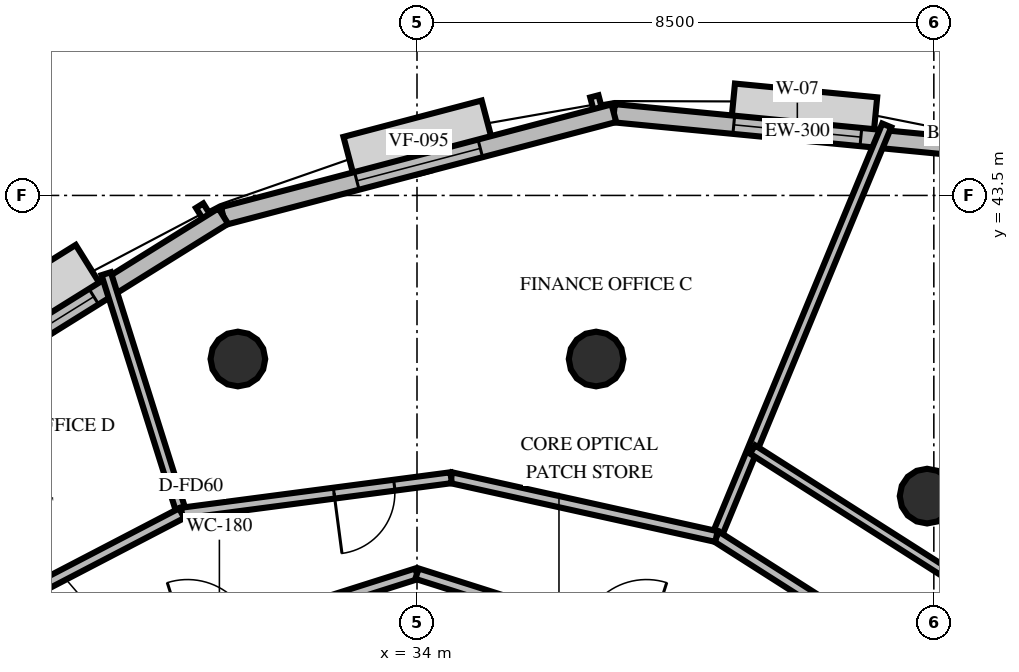
"""IFC4 building model, lengths in metres.
Left out: names, types, materials, properties, quantities, classifications, styles, units other than length and angle.
Written with IfcOpenShell. Run it as: python <this file> out.ifc"""

import sys

from ifc_helpers import new_model, si_unit, direction, frame, frame_2d, origin, origin_2d, place, context, subcontext, project, spatial, rectangle, circle, extrude, element, fill, save


model = new_model("IFC4")
c1 = context("Model", 3, precision=1e-05, world=origin(), true_north=direction((0.0, 1.0)))
c2 = subcontext(c1, "Body", "Model", "MODEL_VIEW")
j1 = project(units=[si_unit("LENGTHUNIT", "METRE"), si_unit("PLANEANGLEUNIT", "RADIAN")], contexts=[c1])
p1 = place(None, origin())
s1 = spatial("IfcSite", under=j1, at=p1, CompositionType="ELEMENT")
p2 = place(p1, origin())
s2 = spatial("IfcBuilding", under=s1, at=p2, CompositionType="ELEMENT")
p3 = place(p2, frame((0.0, 0.0, 230.4)))
s3 = spatial("IfcBuildingStorey", under=s2, at=p3, CompositionType="ELEMENT", Elevation=230.4)
for number, where, z_axis, x_axis in (
    (1, (42.389, 38.555, -0.22), (0.0, 0.0, 1.0), (1.0, 0.0, 0.0)),
    (2, (36.946, 40.81, -0.22), (0.0, 0.0, 1.0), (1.0, 0.0, 0.0)),
    (3, (31.054, 40.81, -0.22), (0.0, 0.0, 1.0), (1.0, 0.0, 0.0)),
):
    element("IfcColumn", number, at=place(p3, frame(where, z_axis=z_axis, x_axis=x_axis)), inside=s3, PredefinedType="COLUMN", context=c2, shape_type="SweptSolid", body=[
        extrude(circle(Radius=0.45, at=origin_2d()), origin(), (0.0, 0.0, 1.0), 3.82),
    ])
p4 = place(p3, frame((43.272, 44.269, 0.0), z_axis=(0.0, 0.0, 1.0), x_axis=(-0.995368057739, 0.096137555791, 0.0)))
e4 = element("IfcWall", 4, at=p4, inside=s3, PredefinedType="SOLIDWALL", context=c2, shape_type="SweptSolid", body=[
    extrude(rectangle(XDim=6.062, YDim=0.3, at=frame_2d((3.031, 0.0))), origin(), (0.0, 0.0, 1.0), 2.76),
])
p5 = place(p4, frame((1.981, 0.0, 0.8)))
e5 = element("IfcOpeningElement", 5, at=p5, cuts=e4, PredefinedType="OPENING", context=c2, shape_type="SweptSolid", body=[
    extrude(rectangle(XDim=2.1, YDim=1.85, at=frame_2d((1.05, 0.925))), frame((0.0, 0.16, 0.0), z_axis=(0.0, -1.0, 0.0), x_axis=(1.0, 0.0, 0.0)), (0.0, 0.0, 1.0), 0.32),
])
p6 = place(p3, frame((37.238, 44.852, 0.0), z_axis=(0.0, 0.0, 1.0), x_axis=(-0.967065492063, -0.254527668555, 0.0)))
e6 = element("IfcWall", 6, at=p6, inside=s3, PredefinedType="SOLIDWALL", context=c2, shape_type="SweptSolid", body=[
    extrude(rectangle(XDim=6.643, YDim=0.3, at=frame_2d((3.322, 0.0))), origin(), (0.0, 0.0, 1.0), 2.76),
])
p7 = place(p6, frame((2.272, 0.0, 0.8)))
e7 = element("IfcOpeningElement", 7, at=p7, cuts=e6, PredefinedType="OPENING", context=c2, shape_type="SweptSolid", body=[
    extrude(rectangle(XDim=2.1, YDim=1.85, at=frame_2d((1.05, 0.925))), frame((0.0, 0.16, 0.0), z_axis=(0.0, -1.0, 0.0), x_axis=(1.0, 0.0, 0.0)), (0.0, 0.0, 1.0), 0.32),
])
p8 = place(p3, frame((30.814, 43.161, 0.0), z_axis=(0.0, 0.0, 1.0), x_axis=(-0.848899232852, -0.528554720406, 0.0)))
e8 = element("IfcWall", 8, at=p8, inside=s3, PredefinedType="SOLIDWALL", context=c2, shape_type="SweptSolid", body=[
    extrude(rectangle(XDim=7.115, YDim=0.3, at=frame_2d((3.558, 0.0))), origin(), (0.0, 0.0, 1.0), 2.76),
])
p9 = place(p8, frame((2.508, 0.0, 0.8)))
e9 = element("IfcOpeningElement", 9, at=p9, cuts=e8, PredefinedType="OPENING", context=c2, shape_type="SweptSolid", body=[
    extrude(rectangle(XDim=2.1, YDim=1.85, at=frame_2d((1.05, 0.925))), frame((0.0, 0.16, 0.0), z_axis=(0.0, -1.0, 0.0), x_axis=(1.0, 0.0, 0.0)), (0.0, 0.0, 1.0), 0.32),
])
p10 = place(p3, frame((27.5, 35.219, 0.0), z_axis=(0.0, 0.0, 1.0), x_axis=(0.953228121756, 0.302251795518, 0.0)))
e10 = element("IfcWall", 10, at=p10, inside=s3, PredefinedType="PARTITIONING", context=c2, shape_type="SweptSolid", body=[
    extrude(rectangle(XDim=6.819, YDim=0.18, at=frame_2d((3.409, 0.0))), origin(), (0.0, 0.0, 1.0), 2.46),
])
p11 = place(p10, frame((2.86, 0.0, 0.0)))
e11 = element("IfcOpeningElement", 11, at=p11, cuts=e10, PredefinedType="OPENING", context=c2, shape_type="SweptSolid", body=[
    extrude(rectangle(XDim=1.1, YDim=2.15, at=frame_2d((0.55, 1.075))), frame((0.0, 0.1, 0.0), z_axis=(0.0, -1.0, 0.0), x_axis=(1.0, 0.0, 0.0)), (0.0, 0.0, 1.0), 0.2),
])
p12 = place(p3, frame((34.0, 37.28, 0.0), z_axis=(0.0, 0.0, 1.0), x_axis=(0.953228121756, -0.302251795518, 0.0)))
e12 = element("IfcWall", 12, at=p12, inside=s3, PredefinedType="PARTITIONING", context=c2, shape_type="SweptSolid", body=[
    extrude(rectangle(XDim=6.819, YDim=0.18, at=frame_2d((3.409, 0.0))), origin(), (0.0, 0.0, 1.0), 2.46),
])
p13 = place(p12, frame((2.86, 0.0, 0.0)))
e13 = element("IfcOpeningElement", 13, at=p13, cuts=e12, PredefinedType="OPENING", context=c2, shape_type="SweptSolid", body=[
    extrude(rectangle(XDim=1.1, YDim=2.15, at=frame_2d((0.55, 1.075))), frame((0.0, 0.1, 0.0), z_axis=(0.0, -1.0, 0.0), x_axis=(1.0, 0.0, 0.0)), (0.0, 0.0, 1.0), 0.2),
])
p14 = place(p3, frame((38.925, 37.89, 0.0), z_axis=(0.0, 0.0, 1.0), x_axis=(0.382676871851, 0.923882249938, 0.0)))
e14 = element("IfcWall", 14, at=p14, inside=s3, PredefinedType="PARTITIONING", context=c2, shape_type="SweptSolid", body=[
    extrude(rectangle(XDim=7.318, YDim=0.16, at=frame_2d((3.659, 0.0))), origin(), (0.0, 0.0, 1.0), 2.46),
])
p15 = place(p3, frame((42.695, 35.489, 0.0), z_axis=(0.0, 0.0, 1.0), x_axis=(-0.843391492769, 0.53729953464, 0.0)))
e15 = element("IfcWall", 15, at=p15, inside=s3, PredefinedType="PARTITIONING", context=c2, shape_type="SweptSolid", body=[
    extrude(rectangle(XDim=4.47, YDim=0.18, at=frame_2d((2.235, 0.0))), origin(), (0.0, 0.0, 1.0), 2.46),
])
p16 = place(p3, frame((43.742, 36.632, 0.0), z_axis=(0.0, 0.0, 1.0), x_axis=(-0.84339841599, 0.537288667204, 0.0)))
e16 = element("IfcWall", 16, at=p16, inside=s3, PredefinedType="PARTITIONING", context=c2, shape_type="SweptSolid", body=[
    extrude(rectangle(XDim=5.008, YDim=0.16, at=frame_2d((2.504, 0.0))), origin(), (0.0, 0.0, 1.0), 2.46),
])
p17 = place(p3, frame((30.13, 38.274, 0.0), z_axis=(0.0, 0.0, 1.0), x_axis=(-0.300684286432, 0.953723733527, 0.0)))
e17 = element("IfcWall", 17, at=p17, inside=s3, PredefinedType="PARTITIONING", context=c2, shape_type="SweptSolid", body=[
    extrude(rectangle(XDim=4.13, YDim=0.16, at=frame_2d((2.065, 0.0))), origin(), (0.0, 0.0, 1.0), 2.46),
])
p18 = place(p3, frame((38.925, 37.89, 0.0), z_axis=(0.0, 0.0, 1.0), x_axis=(-0.976291048481, 0.216461979699, 0.0)))
e18 = element("IfcWall", 18, at=p18, inside=s3, PredefinedType="PARTITIONING", context=c2, shape_type="SweptSolid", body=[
    extrude(rectangle(XDim=4.47, YDim=0.18, at=frame_2d((2.235, 0.0))), origin(), (0.0, 0.0, 1.0), 2.46),
])
p19 = place(p3, frame((34.561, 38.858, 0.0), z_axis=(0.0, 0.0, 1.0), x_axis=(-0.991442206796, -0.130546354154, 0.0)))
e19 = element("IfcWall", 19, at=p19, inside=s3, PredefinedType="PARTITIONING", context=c2, shape_type="SweptSolid", body=[
    extrude(rectangle(XDim=4.47, YDim=0.18, at=frame_2d((2.235, 0.0))), origin(), (0.0, 0.0, 1.0), 2.46),
])
p20 = place(p19, frame((0.942, 0.0, 0.0)))
e20 = element("IfcOpeningElement", 20, at=p20, cuts=e19, PredefinedType="OPENING", context=c2, shape_type="SweptSolid", body=[
    extrude(rectangle(XDim=1.0, YDim=2.15, at=frame_2d((0.5, 1.075))), frame((0.0, 0.1, 0.0), z_axis=(0.0, -1.0, 0.0), x_axis=(1.0, 0.0, 0.0)), (0.0, 0.0, 1.0), 0.2),
])
p21 = place(p3, frame((30.13, 38.274, 0.0), z_axis=(0.0, 0.0, 1.0), x_axis=(-0.886999386077, -0.461770602247, 0.0)))
e21 = element("IfcWall", 21, at=p21, inside=s3, PredefinedType="PARTITIONING", context=c2, shape_type="SweptSolid", body=[
    extrude(rectangle(XDim=4.47, YDim=0.18, at=frame_2d((2.235, 0.0))), origin(), (0.0, 0.0, 1.0), 2.46),
])
p22 = place(p5, origin())
e22 = element("IfcWindow", 22, at=p22, inside=s3, PartitioningType="SINGLE_PANEL", PredefinedType="WINDOW", context=c2, shape_type="SweptSolid", body=[
    extrude(rectangle(XDim=2.1, YDim=1.85, at=frame_2d((1.05, 0.925))), frame((0.0, 0.03, 0.0), z_axis=(0.0, -1.0, 0.0), x_axis=(1.0, 0.0, 0.0)), (0.0, 0.0, 1.0), 0.06),
])
fill(e5, e22)
p23 = place(p7, origin())
e23 = element("IfcWindow", 23, at=p23, inside=s3, PartitioningType="SINGLE_PANEL", PredefinedType="WINDOW", context=c2, shape_type="SweptSolid", body=[
    extrude(rectangle(XDim=2.1, YDim=1.85, at=frame_2d((1.05, 0.925))), frame((0.0, 0.03, 0.0), z_axis=(0.0, -1.0, 0.0), x_axis=(1.0, 0.0, 0.0)), (0.0, 0.0, 1.0), 0.06),
])
fill(e7, e23)
p24 = place(p9, origin())
e24 = element("IfcWindow", 24, at=p24, inside=s3, PartitioningType="SINGLE_PANEL", PredefinedType="WINDOW", context=c2, shape_type="SweptSolid", body=[
    extrude(rectangle(XDim=2.1, YDim=1.85, at=frame_2d((1.05, 0.925))), frame((0.0, 0.03, 0.0), z_axis=(0.0, -1.0, 0.0), x_axis=(1.0, 0.0, 0.0)), (0.0, 0.0, 1.0), 0.06),
])
fill(e9, e24)
p25 = place(p20, origin())
e25 = element("IfcDoor", 25, at=p25, inside=s3, OperationType="SINGLE_SWING_RIGHT", PredefinedType="DOOR", context=c2, shape_type="SweptSolid", body=[
    extrude(rectangle(XDim=1.0, YDim=2.15, at=frame_2d((0.5, 1.075))), frame((0.0, 0.025, 0.0), z_axis=(0.0, -1.0, 0.0), x_axis=(1.0, 0.0, 0.0)), (0.0, 0.0, 1.0), 0.05),
])
fill(e20, e25)
save(model, sys.argv[1])
